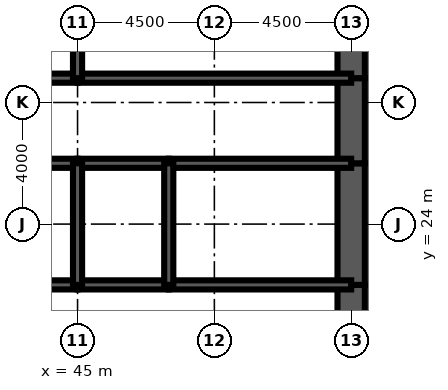
"""IFC4 building model, lengths in metres.
Left out: names, types, materials, properties, quantities, classifications, styles, units other than length and angle.
Written with IfcOpenShell. Run it as: python <this file> out.ifc"""

import sys

from ifc_helpers import new_model, si_unit, direction, frame, frame_2d, origin, place, context, subcontext, project, spatial, rectangle, extrude, element, fill, save


model = new_model("IFC4")
c1 = context("Model", 3, precision=1e-05, world=origin(), true_north=direction((0.0, 1.0)))
c2 = subcontext(c1, "Body", "Model", "MODEL_VIEW")
j1 = project(units=[si_unit("LENGTHUNIT", "METRE"), si_unit("PLANEANGLEUNIT", "RADIAN")], contexts=[c1])
p1 = place(None, origin())
s1 = spatial("IfcSite", under=j1, at=p1, CompositionType="ELEMENT")
p2 = place(p1, origin())
s2 = spatial("IfcBuilding", under=s1, at=p2, CompositionType="ELEMENT")
p3 = place(p2, frame((0.0, 0.0, 134.1)))
s3 = spatial("IfcBuildingStorey", under=s2, at=p3, CompositionType="ELEMENT", Elevation=134.1)
p4 = place(p3, frame((54.0, 19.2, 0.0), z_axis=(0.0, 0.0, 1.0), x_axis=(0.0, 1.0, 0.0)))
e1 = element("IfcWall", 1, at=p4, inside=s3, PredefinedType="SHEAR", context=c2, shape_type="SweptSolid", body=[
    extrude(rectangle(XDim=2.8, YDim=0.9, at=frame_2d((1.4, 0.0))), origin(), (0.0, 0.0, 1.0), 4.2),
])
p5 = place(p4, frame((0.4, 0.0, 0.0)))
e2 = element("IfcOpeningElement", 2, at=p5, cuts=e1, PredefinedType="OPENING", context=c2, shape_type="SweptSolid", body=[
    extrude(rectangle(XDim=1.8, YDim=2.1, at=frame_2d((0.9, 1.05))), frame((0.0, 0.46, 0.0), z_axis=(0.0, -1.0, 0.0), x_axis=(1.0, 0.0, 0.0)), (0.0, 0.0, 1.0), 0.92),
])
p6 = place(p3, frame((54.0, 22.0, 0.0), z_axis=(0.0, 0.0, 1.0), x_axis=(0.0, 1.0, 0.0)))
e3 = element("IfcWall", 3, at=p6, inside=s3, PredefinedType="SHEAR", context=c2, shape_type="SweptSolid", body=[
    extrude(rectangle(XDim=4.0, YDim=0.9, at=frame_2d((2.0, 0.0))), origin(), (0.0, 0.0, 1.0), 4.2),
])
p7 = place(p3, frame((54.0, 26.0, 0.0), z_axis=(0.0, 0.0, 1.0), x_axis=(0.0, 1.0, 0.0)))
e4 = element("IfcWall", 4, at=p7, inside=s3, PredefinedType="SHEAR", context=c2, shape_type="SweptSolid", body=[
    extrude(rectangle(XDim=2.8, YDim=0.9, at=frame_2d((1.4, 0.0))), origin(), (0.0, 0.0, 1.0), 4.2),
])
p8 = place(p7, frame((0.6, 0.0, 0.0)))
e5 = element("IfcOpeningElement", 5, at=p8, cuts=e4, PredefinedType="OPENING", context=c2, shape_type="SweptSolid", body=[
    extrude(rectangle(XDim=1.8, YDim=2.1, at=frame_2d((0.9, 1.05))), frame((0.0, 0.46, 0.0), z_axis=(0.0, -1.0, 0.0), x_axis=(1.0, 0.0, 0.0)), (0.0, 0.0, 1.0), 0.92),
])
p9 = place(p3, frame((54.0, 28.8, 0.0), z_axis=(0.0, 0.0, 1.0), x_axis=(0.0, 1.0, 0.0)))
e6 = element("IfcWall", 6, at=p9, inside=s3, PredefinedType="SHEAR", context=c2, shape_type="SweptSolid", body=[
    extrude(rectangle(XDim=3.2, YDim=0.9, at=frame_2d((1.6, 0.0))), origin(), (0.0, 0.0, 1.0), 4.2),
])
p10 = place(p3, frame((42.0, 28.8, 0.0), z_axis=(0.0, 0.0, 1.0), x_axis=(1.0, 0.0, 0.0)))
e7 = element("IfcWall", 7, at=p10, inside=s3, PredefinedType="SOLIDWALL", context=c2, shape_type="SweptSolid", body=[
    extrude(rectangle(XDim=3.0, YDim=0.3, at=frame_2d((1.5, 0.0))), origin(), (0.0, 0.0, 1.0), 4.2),
])
p11 = place(p10, frame((0.95, 0.0, 0.0)))
e8 = element("IfcOpeningElement", 8, at=p11, cuts=e7, PredefinedType="OPENING", context=c2, shape_type="SweptSolid", body=[
    extrude(rectangle(XDim=1.1, YDim=2.2, at=frame_2d((0.55, 1.1))), frame((0.0, 0.16, 0.0), z_axis=(0.0, -1.0, 0.0), x_axis=(1.0, 0.0, 0.0)), (0.0, 0.0, 1.0), 0.32),
])
p12 = place(p3, frame((45.0, 28.8, 0.0), z_axis=(0.0, 0.0, 1.0), x_axis=(1.0, 0.0, 0.0)))
e9 = element("IfcWall", 9, at=p12, inside=s3, PredefinedType="SOLIDWALL", context=c2, shape_type="SweptSolid", body=[
    extrude(rectangle(XDim=9.0, YDim=0.3, at=frame_2d((4.5, 0.0))), origin(), (0.0, 0.0, 1.0), 4.2),
])
p13 = place(p12, frame((7.35, 0.0, 0.0)))
e10 = element("IfcOpeningElement", 10, at=p13, cuts=e9, PredefinedType="OPENING", context=c2, shape_type="SweptSolid", body=[
    extrude(rectangle(XDim=1.0, YDim=2.1, at=frame_2d((0.5, 1.05))), frame((0.0, 0.16, 0.0), z_axis=(0.0, -1.0, 0.0), x_axis=(1.0, 0.0, 0.0)), (0.0, 0.0, 1.0), 0.32),
])
p14 = place(p3, frame((36.0, 22.0, 0.0), z_axis=(0.0, 0.0, 1.0), x_axis=(1.0, 0.0, 0.0)))
e11 = element("IfcWall", 11, at=p14, inside=s3, PredefinedType="SOLIDWALL", context=c2, shape_type="SweptSolid", body=[
    extrude(rectangle(XDim=9.0, YDim=0.3, at=frame_2d((4.5, 0.0))), origin(), (0.0, 0.0, 1.0), 4.2),
])
p15 = place(p14, frame((4.0, 0.0, 0.0)))
e12 = element("IfcOpeningElement", 12, at=p15, cuts=e11, PredefinedType="OPENING", context=c2, shape_type="SweptSolid", body=[
    extrude(rectangle(XDim=1.0, YDim=2.1, at=frame_2d((0.5, 1.05))), frame((0.0, 0.16, 0.0), z_axis=(0.0, -1.0, 0.0), x_axis=(1.0, 0.0, 0.0)), (0.0, 0.0, 1.0), 0.32),
])
p16 = place(p3, frame((45.0, 22.0, 0.0), z_axis=(0.0, 0.0, 1.0), x_axis=(1.0, 0.0, 0.0)))
e13 = element("IfcWall", 13, at=p16, inside=s3, PredefinedType="SOLIDWALL", context=c2, shape_type="SweptSolid", body=[
    extrude(rectangle(XDim=3.0, YDim=0.3, at=frame_2d((1.5, 0.0))), origin(), (0.0, 0.0, 1.0), 4.2),
])
p17 = place(p16, frame((1.0, 0.0, 0.0)))
e14 = element("IfcOpeningElement", 14, at=p17, cuts=e13, PredefinedType="OPENING", context=c2, shape_type="SweptSolid", body=[
    extrude(rectangle(XDim=1.0, YDim=2.1, at=frame_2d((0.5, 1.05))), frame((0.0, 0.16, 0.0), z_axis=(0.0, -1.0, 0.0), x_axis=(1.0, 0.0, 0.0)), (0.0, 0.0, 1.0), 0.32),
])
p18 = place(p3, frame((48.0, 22.0, 0.0), z_axis=(0.0, 0.0, 1.0), x_axis=(1.0, 0.0, 0.0)))
e15 = element("IfcWall", 15, at=p18, inside=s3, PredefinedType="SOLIDWALL", context=c2, shape_type="SweptSolid", body=[
    extrude(rectangle(XDim=6.0, YDim=0.3, at=frame_2d((3.0, 0.0))), origin(), (0.0, 0.0, 1.0), 4.2),
])
p19 = place(p18, frame((2.0, 0.0, 0.0)))
e16 = element("IfcOpeningElement", 16, at=p19, cuts=e15, PredefinedType="OPENING", context=c2, shape_type="SweptSolid", body=[
    extrude(rectangle(XDim=1.0, YDim=2.1, at=frame_2d((0.5, 1.05))), frame((0.0, 0.16, 0.0), z_axis=(0.0, -1.0, 0.0), x_axis=(1.0, 0.0, 0.0)), (0.0, 0.0, 1.0), 0.32),
])
p20 = place(p18, frame((4.0, 0.0, 0.0)))
e17 = element("IfcOpeningElement", 17, at=p20, cuts=e15, PredefinedType="OPENING", context=c2, shape_type="SweptSolid", body=[
    extrude(rectangle(XDim=1.0, YDim=2.1, at=frame_2d((0.5, 1.05))), frame((0.0, 0.16, 0.0), z_axis=(0.0, -1.0, 0.0), x_axis=(1.0, 0.0, 0.0)), (0.0, 0.0, 1.0), 0.32),
])
p21 = place(p3, frame((36.0, 26.0, 0.0), z_axis=(0.0, 0.0, 1.0), x_axis=(1.0, 0.0, 0.0)))
e18 = element("IfcWall", 18, at=p21, inside=s3, PredefinedType="SOLIDWALL", context=c2, shape_type="SweptSolid", body=[
    extrude(rectangle(XDim=9.0, YDim=0.3, at=frame_2d((4.5, 0.0))), origin(), (0.0, 0.0, 1.0), 4.2),
])
p22 = place(p3, frame((45.0, 26.0, 0.0), z_axis=(0.0, 0.0, 1.0), x_axis=(1.0, 0.0, 0.0)))
e19 = element("IfcWall", 19, at=p22, inside=s3, PredefinedType="SOLIDWALL", context=c2, shape_type="SweptSolid", body=[
    extrude(rectangle(XDim=3.0, YDim=0.3, at=frame_2d((1.5, 0.0))), origin(), (0.0, 0.0, 1.0), 4.2),
])
p23 = place(p3, frame((48.0, 26.0, 0.0), z_axis=(0.0, 0.0, 1.0), x_axis=(1.0, 0.0, 0.0)))
e20 = element("IfcWall", 20, at=p23, inside=s3, PredefinedType="SOLIDWALL", context=c2, shape_type="SweptSolid", body=[
    extrude(rectangle(XDim=6.0, YDim=0.3, at=frame_2d((3.0, 0.0))), origin(), (0.0, 0.0, 1.0), 4.2),
])
p24 = place(p3, frame((45.0, 28.8, 0.0), z_axis=(0.0, 0.0, 1.0), x_axis=(0.0, 1.0, 0.0)))
e21 = element("IfcWall", 21, at=p24, inside=s3, PredefinedType="SOLIDWALL", context=c2, shape_type="SweptSolid", body=[
    extrude(rectangle(XDim=3.2, YDim=0.3, at=frame_2d((1.6, 0.0))), origin(), (0.0, 0.0, 1.0), 4.2),
])
for number, where, z_axis, x_axis in (
    (22, (45.0, 22.0, 0.0), (0.0, 0.0, 1.0), (0.0, 1.0, 0.0)),
    (23, (48.0, 22.0, 0.0), (0.0, 0.0, 1.0), (0.0, 1.0, 0.0)),
):
    element("IfcWall", number, at=place(p3, frame(where, z_axis=z_axis, x_axis=x_axis)), inside=s3, PredefinedType="SOLIDWALL", context=c2, shape_type="SweptSolid", body=[
        extrude(rectangle(XDim=4.0, YDim=0.3, at=frame_2d((2.0, 0.0))), origin(), (0.0, 0.0, 1.0), 4.2),
    ])
p25 = place(p3, frame((51.375, 22.15, 0.0), z_axis=(0.0, 0.0, 1.0), x_axis=(0.0, 1.0, 0.0)))
e24 = element("IfcWall", 24, at=p25, inside=s3, PredefinedType="PARTITIONING", context=c2, shape_type="SweptSolid", body=[
    extrude(rectangle(XDim=3.7, YDim=0.15, at=frame_2d((1.85, 0.0))), origin(), (0.0, 0.0, 1.0), 3.0),
])
p26 = place(p3, frame((49.2, 26.15, 0.0), z_axis=(0.0, 0.0, 1.0), x_axis=(0.0, 1.0, 0.0)))
e25 = element("IfcWall", 25, at=p26, inside=s3, PredefinedType="PARTITIONING", context=c2, shape_type="SweptSolid", body=[
    extrude(rectangle(XDim=2.5, YDim=0.15, at=frame_2d((1.25, 0.0))), origin(), (0.0, 0.0, 1.0), 3.0),
])
p27 = place(p26, frame((1.15, 0.0, 0.0)))
e26 = element("IfcOpeningElement", 26, at=p27, cuts=e25, PredefinedType="OPENING", context=c2, shape_type="SweptSolid", body=[
    extrude(rectangle(XDim=1.0, YDim=2.1, at=frame_2d((0.5, 1.05))), frame((0.0, 0.085, 0.0), z_axis=(0.0, -1.0, 0.0), x_axis=(1.0, 0.0, 0.0)), (0.0, 0.0, 1.0), 0.17),
])
p28 = place(p27, origin())
e27 = element("IfcDoor", 27, at=p28, inside=s3, OperationType="SINGLE_SWING_RIGHT", PredefinedType="DOOR", context=c2, shape_type="SweptSolid", body=[
    extrude(rectangle(XDim=1.0, YDim=2.1, at=frame_2d((0.5, 1.05))), frame((0.0, 0.025, 0.0), z_axis=(0.0, -1.0, 0.0), x_axis=(1.0, 0.0, 0.0)), (0.0, 0.0, 1.0), 0.05),
])
fill(e26, e27)
p29 = place(p13, origin())
e28 = element("IfcDoor", 28, at=p29, inside=s3, OperationType="SINGLE_SWING_RIGHT", PredefinedType="DOOR", context=c2, shape_type="SweptSolid", body=[
    extrude(rectangle(XDim=1.0, YDim=2.1, at=frame_2d((0.5, 1.05))), frame((0.0, 0.025, 0.0), z_axis=(0.0, -1.0, 0.0), x_axis=(1.0, 0.0, 0.0)), (0.0, 0.0, 1.0), 0.05),
])
fill(e10, e28)
p30 = place(p5, origin())
e29 = element("IfcDoor", 29, at=p30, inside=s3, OperationType="SINGLE_SWING_LEFT", PredefinedType="DOOR", context=c2, shape_type="SweptSolid", body=[
    extrude(rectangle(XDim=1.8, YDim=2.1, at=frame_2d((0.9, 1.05))), frame((0.0, 0.45, 0.0), z_axis=(0.0, -1.0, 0.0), x_axis=(1.0, 0.0, 0.0)), (0.0, 0.0, 1.0), 0.899),
])
fill(e2, e29)
p31 = place(p8, origin())
e30 = element("IfcDoor", 30, at=p31, inside=s3, OperationType="SINGLE_SWING_LEFT", PredefinedType="DOOR", context=c2, shape_type="SweptSolid", body=[
    extrude(rectangle(XDim=1.8, YDim=2.1, at=frame_2d((0.9, 1.05))), frame((0.0, 0.45, 0.0), z_axis=(0.0, -1.0, 0.0), x_axis=(1.0, 0.0, 0.0)), (0.0, 0.0, 1.0), 0.899),
])
fill(e5, e30)
p32 = place(p17, origin())
e31 = element("IfcDoor", 31, at=p32, inside=s3, OperationType="SINGLE_SWING_LEFT", PredefinedType="DOOR", context=c2, shape_type="SweptSolid", body=[
    extrude(rectangle(XDim=1.0, YDim=2.1, at=frame_2d((0.5, 1.05))), frame((0.0, 0.025, 0.0), z_axis=(0.0, -1.0, 0.0), x_axis=(1.0, 0.0, 0.0)), (0.0, 0.0, 1.0), 0.05),
])
fill(e14, e31)
p33 = place(p19, origin())
e32 = element("IfcDoor", 32, at=p33, inside=s3, OperationType="SINGLE_SWING_LEFT", PredefinedType="DOOR", context=c2, shape_type="SweptSolid", body=[
    extrude(rectangle(XDim=1.0, YDim=2.1, at=frame_2d((0.5, 1.05))), frame((0.0, 0.025, 0.0), z_axis=(0.0, -1.0, 0.0), x_axis=(1.0, 0.0, 0.0)), (0.0, 0.0, 1.0), 0.05),
])
fill(e16, e32)
p34 = place(p20, origin())
e33 = element("IfcDoor", 33, at=p34, inside=s3, OperationType="SINGLE_SWING_RIGHT", PredefinedType="DOOR", context=c2, shape_type="SweptSolid", body=[
    extrude(rectangle(XDim=1.0, YDim=2.1, at=frame_2d((0.5, 1.05))), frame((0.0, 0.025, 0.0), z_axis=(0.0, -1.0, 0.0), x_axis=(1.0, 0.0, 0.0)), (0.0, 0.0, 1.0), 0.05),
])
fill(e17, e33)
save(model, sys.argv[1])
